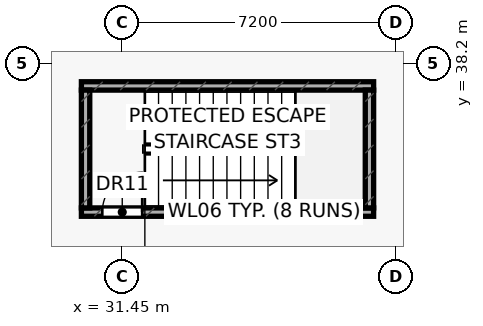
"""IFC4 building model, lengths in metres.
Left out: names, types, materials, properties, quantities, classifications, styles, units other than length and angle.
Written with IfcOpenShell. Run it as: python <this file> out.ifc"""

import sys

from ifc_helpers import new_model, si_unit, direction, frame, frame_2d, origin, place, context, subcontext, project, spatial, rectangle, extrude, element, fill, save


model = new_model("IFC4")
c1 = context("Model", 3, precision=1e-05, world=origin(), true_north=direction((0.0, 1.0)))
c2 = subcontext(c1, "Body", "Model", "MODEL_VIEW")
j1 = project(units=[si_unit("LENGTHUNIT", "METRE"), si_unit("PLANEANGLEUNIT", "RADIAN")], contexts=[c1])
p1 = place(None, origin())
s1 = spatial("IfcSite", under=j1, at=p1, CompositionType="ELEMENT")
p2 = place(p1, origin())
s2 = spatial("IfcBuilding", under=s1, at=p2, CompositionType="ELEMENT")
p3 = place(p2, frame((0.0, 0.0, -4.2)))
s3 = spatial("IfcBuildingStorey", under=s2, at=p3, CompositionType="ELEMENT", Elevation=-4.2)
p4 = place(p3, frame((30.38, 34.29, 0.0), z_axis=(0.0, 0.0, 1.0), x_axis=(1.0, 0.0, 0.0)))
e1 = element("IfcWall", 1, at=p4, inside=s3, PredefinedType="SHEAR", context=c2, shape_type="SweptSolid", body=[
    extrude(rectangle(XDim=7.69, YDim=0.22, at=frame_2d((3.845, 0.0))), origin(), (0.0, 0.0, 1.0), 3.85),
])
p5 = place(p4, frame((0.55, 0.0, 0.0)))
e2 = element("IfcOpeningElement", 2, at=p5, cuts=e1, PredefinedType="OPENING", context=c2, shape_type="SweptSolid", body=[
    extrude(rectangle(XDim=1.05, YDim=2.2, at=frame_2d((0.525, 1.1))), frame((0.0, 0.12, 0.0), z_axis=(0.0, -1.0, 0.0), x_axis=(1.0, 0.0, 0.0)), (0.0, 0.0, 1.0), 0.24),
])
p6 = place(p3, frame((30.38, 37.61, 0.0), z_axis=(0.0, 0.0, 1.0), x_axis=(1.0, 0.0, 0.0)))
e3 = element("IfcWall", 3, at=p6, inside=s3, PredefinedType="SHEAR", context=c2, shape_type="SweptSolid", body=[
    extrude(rectangle(XDim=7.69, YDim=0.22, at=frame_2d((3.845, 0.0))), origin(), (0.0, 0.0, 1.0), 3.85),
])
for number, where, z_axis, x_axis in (
    (4, (37.96, 34.4, 0.0), (0.0, 0.0, 1.0), (0.0, 1.0, 0.0)),
    (5, (30.49, 34.4, 0.0), (0.0, 0.0, 1.0), (0.0, 1.0, 0.0)),
):
    element("IfcWall", number, at=place(p3, frame(where, z_axis=z_axis, x_axis=x_axis)), inside=s3, PredefinedType="SHEAR", context=c2, shape_type="SweptSolid", body=[
        extrude(rectangle(XDim=3.1, YDim=0.22, at=frame_2d((1.55, 0.0))), origin(), (0.0, 0.0, 1.0), 3.85),
    ])
p7 = place(p5, origin())
e6 = element("IfcDoor", 6, at=p7, inside=s3, OperationType="SINGLE_SWING_RIGHT", PredefinedType="DOOR", context=c2, shape_type="SweptSolid", body=[
    extrude(rectangle(XDim=1.05, YDim=2.2, at=frame_2d((0.525, 1.1))), frame((0.0, 0.025, 0.0), z_axis=(0.0, -1.0, 0.0), x_axis=(1.0, 0.0, 0.0)), (0.0, 0.0, 1.0), 0.05),
])
fill(e2, e6)
save(model, sys.argv[1])
